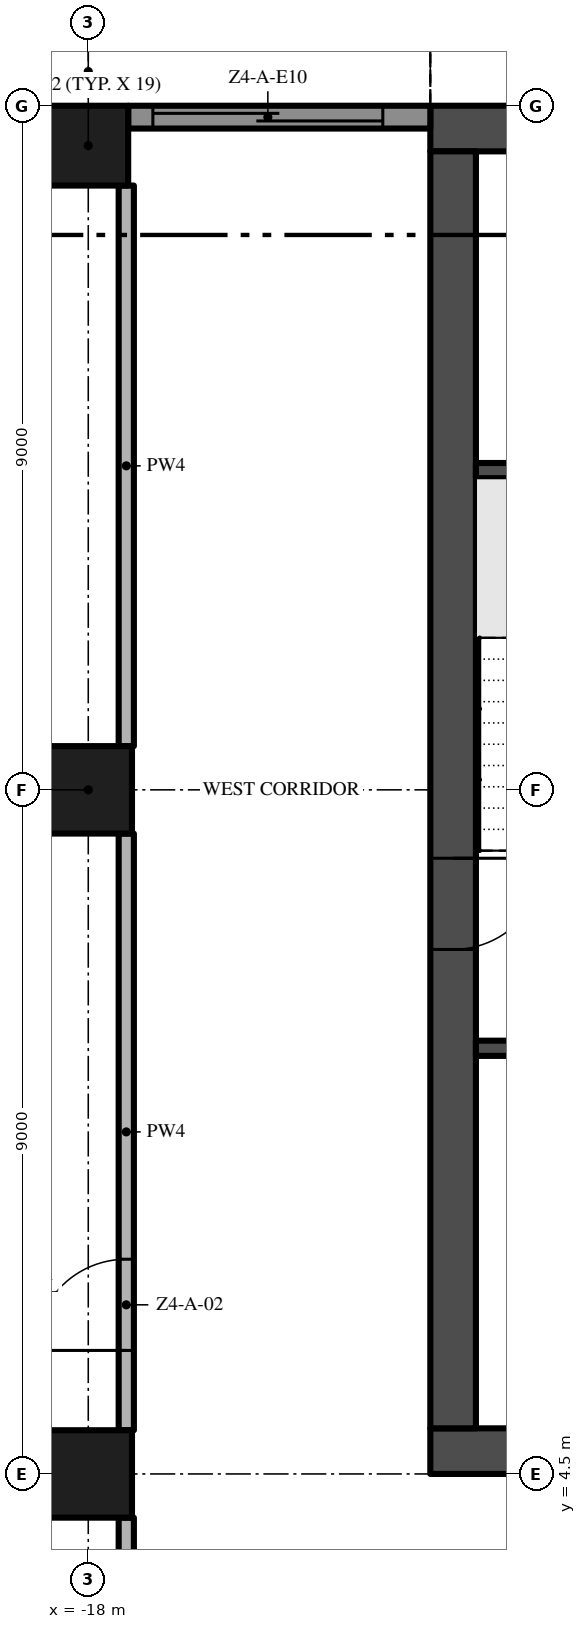
"""IFC4 building model, lengths in metres.
Left out: names, types, materials, properties, quantities, classifications, styles, units other than length and angle.
Written with IfcOpenShell. Run it as: python <this file> out.ifc"""

import sys

from ifc_helpers import new_model, si_unit, direction, frame, frame_2d, origin, origin_2d, place, context, subcontext, project, spatial, polyline, rectangle, outline, extrude, element, fill, save


model = new_model("IFC4")
c1 = context("Model", 3, precision=1e-05, world=origin(), true_north=direction((0.0, 1.0)))
c2 = subcontext(c1, "Body", "Model", "MODEL_VIEW")
j1 = project(units=[si_unit("LENGTHUNIT", "METRE"), si_unit("PLANEANGLEUNIT", "RADIAN")], contexts=[c1])
p1 = place(None, origin())
s1 = spatial("IfcSite", under=j1, at=p1, CompositionType="ELEMENT")
p2 = place(p1, origin())
s2 = spatial("IfcBuilding", under=s1, at=p2, CompositionType="ELEMENT")
p3 = place(p2, frame((0.0, 0.0, 184.4)))
s3 = spatial("IfcBuildingStorey", under=s2, at=p3, CompositionType="ELEMENT", Elevation=184.4)
p4 = place(p3, frame((-13.5, 4.8, -0.3), z_axis=(0.0, 0.0, 1.0), x_axis=(1.0, 0.0, 0.0)))
e1 = element("IfcWall", 1, at=p4, inside=s3, PredefinedType="SHEAR", context=c2, shape_type="SweptSolid", body=[
    extrude(rectangle(XDim=27.0, YDim=0.6, at=frame_2d((13.5, 0.0))), origin(), (0.0, 0.0, 1.0), 3.8),
])
p5 = place(p4, frame((12.0, 0.0, 0.3)))
e2 = element("IfcOpeningElement", 2, at=p5, cuts=e1, PredefinedType="OPENING", context=c2, shape_type="SweptSolid", body=[
    extrude(rectangle(XDim=3.0, YDim=2.4, at=frame_2d((1.5, 1.2))), frame((0.0, 0.31, 0.0), z_axis=(0.0, -1.0, 0.0), x_axis=(1.0, 0.0, 0.0)), (0.0, 0.0, 1.0), 0.62),
])
p6 = place(p4, frame((4.9, 0.0, 0.3)))
e3 = element("IfcOpeningElement", 3, at=p6, cuts=e1, PredefinedType="OPENING", context=c2, shape_type="SweptSolid", body=[
    extrude(rectangle(XDim=1.2, YDim=2.2, at=frame_2d((0.6, 1.1))), frame((0.0, 0.31, 0.0), z_axis=(0.0, -1.0, 0.0), x_axis=(1.0, 0.0, 0.0)), (0.0, 0.0, 1.0), 0.62),
])
p7 = place(p4, frame((20.75, 0.0, 0.3)))
e4 = element("IfcOpeningElement", 4, at=p7, cuts=e1, PredefinedType="OPENING", context=c2, shape_type="SweptSolid", body=[
    extrude(rectangle(XDim=1.5, YDim=2.2, at=frame_2d((0.75, 1.1))), frame((0.0, 0.31, 0.0), z_axis=(0.0, -1.0, 0.0), x_axis=(1.0, 0.0, 0.0)), (0.0, 0.0, 1.0), 0.62),
])
p8 = place(p4, frame((17.4, 0.0, 0.3)))
e5 = element("IfcOpeningElement", 5, at=p8, cuts=e1, PredefinedType="OPENING", context=c2, shape_type="SweptSolid", body=[
    extrude(rectangle(XDim=1.2, YDim=2.2, at=frame_2d((0.6, 1.1))), frame((0.0, 0.31, 0.0), z_axis=(0.0, -1.0, 0.0), x_axis=(1.0, 0.0, 0.0)), (0.0, 0.0, 1.0), 0.62),
])
p9 = place(p3, frame((13.5, 22.2, -0.3), z_axis=(0.0, 0.0, 1.0), x_axis=(-1.0, 0.0, 0.0)))
e6 = element("IfcWall", 6, at=p9, inside=s3, PredefinedType="SHEAR", context=c2, shape_type="SweptSolid", body=[
    extrude(rectangle(XDim=27.0, YDim=0.6, at=frame_2d((13.5, 0.0))), origin(), (0.0, 0.0, 1.0), 3.8),
])
p10 = place(p3, frame((-13.2, 21.9, -0.3), z_axis=(0.0, 0.0, 1.0), x_axis=(0.0, -1.0, 0.0)))
e7 = element("IfcWall", 7, at=p10, inside=s3, PredefinedType="SHEAR", context=c2, shape_type="SweptSolid", body=[
    extrude(rectangle(XDim=16.8, YDim=0.6, at=frame_2d((8.4, 0.0))), origin(), (0.0, 0.0, 1.0), 3.8),
])
p11 = place(p10, frame((9.3, 0.0, 0.3)))
e8 = element("IfcOpeningElement", 8, at=p11, cuts=e7, PredefinedType="OPENING", context=c2, shape_type="SweptSolid", body=[
    extrude(rectangle(XDim=1.2, YDim=2.2, at=frame_2d((0.6, 1.1))), frame((0.0, 0.31, 0.0), z_axis=(0.0, -1.0, 0.0), x_axis=(1.0, 0.0, 0.0)), (0.0, 0.0, 1.0), 0.62),
])
p12 = place(p3, frame((-18.0, 13.5, 0.0), z_axis=(0.0, 0.0, 1.0), x_axis=(1.0, 0.0, 0.0)))
e9 = element("IfcColumn", 9, at=p12, inside=s3, PredefinedType="COLUMN", context=c2, shape_type="SweptSolid", body=[
    extrude(rectangle(XDim=1.15, YDim=1.15, at=origin_2d()), origin(), (0.0, 0.0, 1.0), 3.5),
])
p13 = place(p3, frame((-18.0, 21.975, 0.0), z_axis=(0.0, 0.0, 1.0), x_axis=(1.0, 0.0, 0.0)))
e10 = element("IfcColumn", 10, at=p13, inside=s3, PredefinedType="COLUMN", context=c2, shape_type="SweptSolid", body=[
    extrude(rectangle(XDim=1.05, YDim=1.05, at=origin_2d()), origin(), (0.0, 0.0, 1.0), 3.5),
])
p14 = place(p3, frame((-18.0, 4.5, 0.0), z_axis=(0.0, 0.0, 1.0), x_axis=(1.0, 0.0, 0.0)))
e11 = element("IfcColumn", 11, at=p14, inside=s3, PredefinedType="COLUMN", context=c2, shape_type="SweptSolid", body=[
    extrude(rectangle(XDim=1.15, YDim=1.15, at=origin_2d()), origin(), (0.0, 0.0, 1.0), 3.5),
])
p15 = place(p3, frame((-17.475, 22.35, 0.0), z_axis=(0.0, 0.0, 1.0), x_axis=(1.0, 0.0, 0.0)))
e12 = element("IfcWall", 12, at=p15, inside=s3, PredefinedType="SOLIDWALL", context=c2, shape_type="SweptSolid", body=[
    extrude(rectangle(XDim=3.975, YDim=0.3, at=frame_2d((1.988, 0.0))), origin(), (0.0, 0.0, 1.0), 3.5),
])
p16 = place(p15, frame((0.325, 0.0, 0.0)))
e13 = element("IfcOpeningElement", 13, at=p16, cuts=e12, PredefinedType="OPENING", context=c2, shape_type="SweptSolid", body=[
    extrude(rectangle(XDim=3.025, YDim=2.4, at=frame_2d((1.512, 1.2))), frame((0.0, 0.16, 0.0), z_axis=(0.0, -1.0, 0.0), x_axis=(1.0, 0.0, 0.0)), (0.0, 0.0, 1.0), 0.32),
])
p17 = place(p3, origin())
e14 = element("IfcWall", 14, at=p17, inside=s3, PredefinedType="USERDEFINED", context=c2, shape_type="SweptSolid", body=[
    extrude(outline(polyline([(-13.5, 25.149), (-15.0, 25.485), (-15.375, 25.5), (-16.5, 25.369), (-18.0, 24.845), (-19.5, 24.112), (-21.0, 23.451), (-22.5, 23.115), (-22.445, 22.871), (-20.921, 23.213), (-19.395, 23.885), (-17.904, 24.614), (-16.444, 25.124), (-15.365, 25.249), (-15.033, 25.236), (-13.555, 24.905), (-13.5, 25.149)])), origin(), (0.0, 0.0, 1.0), 0.9),
])
for number, where, z_axis, x_axis in (
    (15, (-12.9, 10.1, 0.0), (0.0, 0.0, 1.0), (1.0, 0.0, 0.0)),
    (16, (-12.9, 17.7, 0.0), (0.0, 0.0, 1.0), (1.0, 0.0, 0.0)),
):
    element("IfcWall", number, at=place(p3, frame(where, z_axis=z_axis, x_axis=x_axis)), inside=s3, PredefinedType="SHEAR", context=c2, shape_type="SweptSolid", body=[
        extrude(rectangle(XDim=3.25, YDim=0.2, at=frame_2d((1.625, 0.0))), origin(), (0.0, 0.0, 1.0), 3.5),
    ])
p18 = place(p3, frame((-17.5, -0.2, 0.0), z_axis=(0.0, 0.0, 1.0), x_axis=(0.0, 1.0, 0.0)))
e17 = element("IfcWall", 17, at=p18, inside=s3, PredefinedType="PARTITIONING", context=c2, shape_type="SweptSolid", body=[
    extrude(rectangle(XDim=4.125, YDim=0.2, at=frame_2d((2.062, 0.0))), origin(), (0.0, 0.0, 1.0), 3.5),
])
p19 = place(p3, frame((-17.5, 5.075, 0.0), z_axis=(0.0, 0.0, 1.0), x_axis=(0.0, 1.0, 0.0)))
e18 = element("IfcWall", 18, at=p19, inside=s3, PredefinedType="PARTITIONING", context=c2, shape_type="SweptSolid", body=[
    extrude(rectangle(XDim=7.85, YDim=0.2, at=frame_2d((3.925, 0.0))), origin(), (0.0, 0.0, 1.0), 3.5),
])
p20 = place(p19, frame((1.05, 0.0, 0.0)))
e19 = element("IfcOpeningElement", 19, at=p20, cuts=e18, PredefinedType="OPENING", context=c2, shape_type="SweptSolid", body=[
    extrude(rectangle(XDim=1.2, YDim=2.4, at=frame_2d((0.6, 1.2))), frame((0.0, 0.11, 0.0), z_axis=(0.0, -1.0, 0.0), x_axis=(1.0, 0.0, 0.0)), (0.0, 0.0, 1.0), 0.22),
])
p21 = place(p3, frame((-17.5, 14.075, 0.0), z_axis=(0.0, 0.0, 1.0), x_axis=(0.0, 1.0, 0.0)))
e20 = element("IfcWall", 20, at=p21, inside=s3, PredefinedType="PARTITIONING", context=c2, shape_type="SweptSolid", body=[
    extrude(rectangle(XDim=7.375, YDim=0.2, at=frame_2d((3.688, 0.0))), origin(), (0.0, 0.0, 1.0), 3.5),
])
p22 = place(p16, origin())
e21 = element("IfcDoor", 21, at=p22, inside=s3, OperationType="SINGLE_SWING_LEFT", PredefinedType="DOOR", context=c2, shape_type="SweptSolid", body=[
    extrude(rectangle(XDim=3.025, YDim=2.4, at=frame_2d((1.512, 1.2))), frame((0.0, 0.025, 0.0), z_axis=(0.0, -1.0, 0.0), x_axis=(1.0, 0.0, 0.0)), (0.0, 0.0, 1.0), 0.05),
])
fill(e13, e21)
p23 = place(p11, frame((1.2, 0.0, 0.0), z_axis=(0.0, 0.0, 1.0), x_axis=(-1.0, 0.0, 0.0)))
e22 = element("IfcDoor", 22, at=p23, inside=s3, OperationType="SINGLE_SWING_RIGHT", PredefinedType="DOOR", context=c2, shape_type="SweptSolid", body=[
    extrude(rectangle(XDim=1.2, YDim=2.2, at=frame_2d((0.6, 1.1))), frame((0.0, 0.025, 0.0), z_axis=(0.0, -1.0, 0.0), x_axis=(1.0, 0.0, 0.0)), (0.0, 0.0, 1.0), 0.05),
])
fill(e8, e22)
p24 = place(p20, origin())
e23 = element("IfcDoor", 23, at=p24, inside=s3, OperationType="SINGLE_SWING_LEFT", PredefinedType="DOOR", context=c2, shape_type="SweptSolid", body=[
    extrude(rectangle(XDim=1.2, YDim=2.4, at=frame_2d((0.6, 1.2))), frame((0.0, 0.025, 0.0), z_axis=(0.0, -1.0, 0.0), x_axis=(1.0, 0.0, 0.0)), (0.0, 0.0, 1.0), 0.05),
])
fill(e19, e23)
save(model, sys.argv[1])
